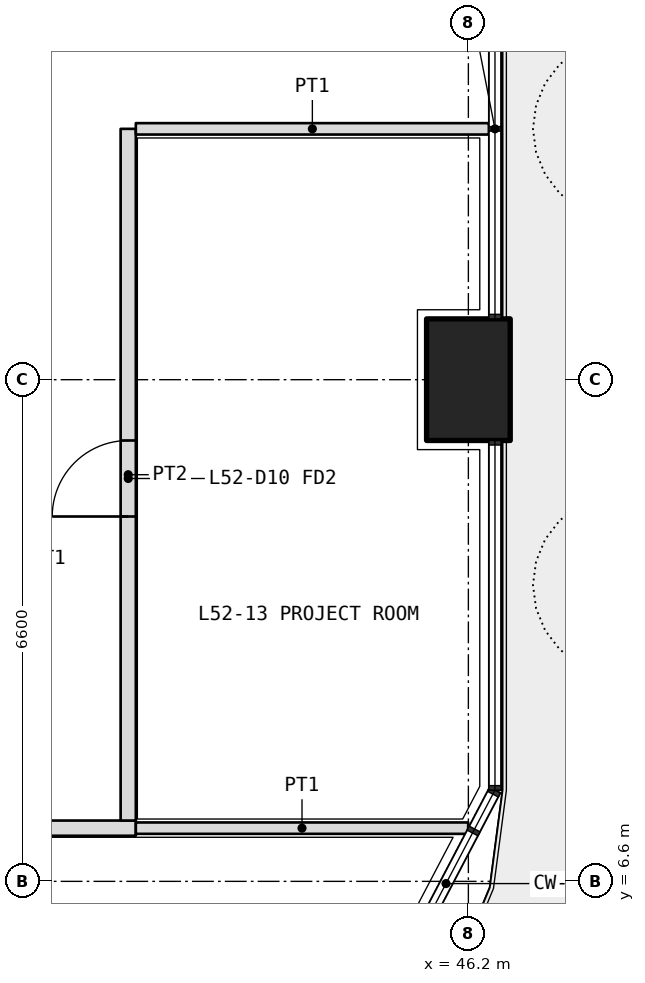
"""IFC4 building model, lengths in metres.
Left out: names, types, materials, properties, quantities, classifications, styles, units other than length and angle.
Written with IfcOpenShell. Run it as: python <this file> out.ifc"""

import sys

from ifc_helpers import new_model, si_unit, direction, frame, frame_2d, origin, origin_2d, place, context, subcontext, project, spatial, rectangle, extrude, element, fill, save


model = new_model("IFC4")
c1 = context("Model", 3, precision=1e-05, world=origin(), true_north=direction((0.0, 1.0)))
c2 = subcontext(c1, "Body", "Model", "MODEL_VIEW")
j1 = project(units=[si_unit("LENGTHUNIT", "METRE"), si_unit("PLANEANGLEUNIT", "RADIAN")], contexts=[c1])
p1 = place(None, origin())
s1 = spatial("IfcSite", under=j1, at=p1, CompositionType="ELEMENT")
p2 = place(p1, origin())
s2 = spatial("IfcBuilding", under=s1, at=p2, CompositionType="ELEMENT")
p3 = place(p2, frame((0.0, 0.0, 229.2)))
s3 = spatial("IfcBuildingStorey", under=s2, at=p3, CompositionType="ELEMENT", Elevation=229.2)
p4 = place(p3, frame((46.2, 13.2, 0.0), z_axis=(0.0, 0.0, 1.0), x_axis=(0.0, 1.0, 0.0)))
e1 = element("IfcColumn", 1, at=p4, inside=s3, PredefinedType="COLUMN", context=c2, shape_type="SweptSolid", body=[
    extrude(rectangle(XDim=1.6, YDim=1.1, at=origin_2d()), origin(), (0.0, 0.0, 1.0), 4.2),
])
p5 = place(p3, frame((10.975, 7.3, 0.0), z_axis=(0.0, 0.0, 1.0), x_axis=(1.0, 0.0, 0.0)))
e2 = element("IfcWall", 2, at=p5, inside=s3, PredefinedType="PARTITIONING", context=c2, shape_type="SweptSolid", body=[
    extrude(rectangle(XDim=30.85, YDim=0.2, at=frame_2d((15.425, 0.0))), origin(), (0.0, 0.0, 1.0), 3.0),
])
p6 = place(p5, frame((3.962, 0.0, 0.0)))
e3 = element("IfcOpeningElement", 3, at=p6, cuts=e2, PredefinedType="OPENING", context=c2, shape_type="SweptSolid", body=[
    extrude(rectangle(XDim=1.0, YDim=2.1, at=frame_2d((0.5, 1.05))), frame((0.0, 0.11, 0.0), z_axis=(0.0, -1.0, 0.0), x_axis=(1.0, 0.0, 0.0)), (0.0, 0.0, 1.0), 0.22),
])
p7 = place(p5, frame((10.425, 0.0, 0.0)))
e4 = element("IfcOpeningElement", 4, at=p7, cuts=e2, PredefinedType="OPENING", context=c2, shape_type="SweptSolid", body=[
    extrude(rectangle(XDim=1.0, YDim=2.1, at=frame_2d((0.5, 1.05))), frame((0.0, 0.11, 0.0), z_axis=(0.0, -1.0, 0.0), x_axis=(1.0, 0.0, 0.0)), (0.0, 0.0, 1.0), 0.22),
])
p8 = place(p5, frame((13.725, 0.0, 0.0)))
e5 = element("IfcOpeningElement", 5, at=p8, cuts=e2, PredefinedType="OPENING", context=c2, shape_type="SweptSolid", body=[
    extrude(rectangle(XDim=1.0, YDim=2.1, at=frame_2d((0.5, 1.05))), frame((0.0, 0.11, 0.0), z_axis=(0.0, -1.0, 0.0), x_axis=(1.0, 0.0, 0.0)), (0.0, 0.0, 1.0), 0.22),
])
p9 = place(p5, frame((22.587, 0.0, 0.0)))
e6 = element("IfcOpeningElement", 6, at=p9, cuts=e2, PredefinedType="OPENING", context=c2, shape_type="SweptSolid", body=[
    extrude(rectangle(XDim=1.0, YDim=2.1, at=frame_2d((0.5, 1.05))), frame((0.0, 0.11, 0.0), z_axis=(0.0, -1.0, 0.0), x_axis=(1.0, 0.0, 0.0)), (0.0, 0.0, 1.0), 0.22),
])
p10 = place(p3, frame((41.725, 7.4, 0.0), z_axis=(0.0, 0.0, 1.0), x_axis=(0.0, 1.0, 0.0)))
e7 = element("IfcWall", 7, at=p10, inside=s3, PredefinedType="PARTITIONING", context=c2, shape_type="SweptSolid", body=[
    extrude(rectangle(XDim=9.1, YDim=0.2, at=frame_2d((4.55, 0.0))), origin(), (0.0, 0.0, 1.0), 3.0),
])
p11 = place(p10, frame((4.0, 0.0, 0.0)))
e8 = element("IfcOpeningElement", 8, at=p11, cuts=e7, PredefinedType="OPENING", context=c2, shape_type="SweptSolid", body=[
    extrude(rectangle(XDim=1.0, YDim=2.1, at=frame_2d((0.5, 1.05))), frame((0.0, 0.11, 0.0), z_axis=(0.0, -1.0, 0.0), x_axis=(1.0, 0.0, 0.0)), (0.0, 0.0, 1.0), 0.22),
])
p12 = place(p3, frame((46.198, 7.3, 0.0), z_axis=(0.0, 0.0, 1.0), x_axis=(-1.0, 0.0, 0.0)))
e9 = element("IfcWall", 9, at=p12, inside=s3, PredefinedType="PARTITIONING", context=c2, shape_type="SweptSolid", body=[
    extrude(rectangle(XDim=4.373, YDim=0.15, at=frame_2d((2.186, 0.0))), origin(), (0.0, 0.0, 1.0), 2.7),
])
p13 = place(p3, frame((46.47, 16.5, 0.0), z_axis=(0.0, 0.0, 1.0), x_axis=(-1.0, 0.0, 0.0)))
e10 = element("IfcWall", 10, at=p13, inside=s3, PredefinedType="PARTITIONING", context=c2, shape_type="SweptSolid", body=[
    extrude(rectangle(XDim=4.645, YDim=0.15, at=frame_2d((2.323, 0.0))), origin(), (0.0, 0.0, 1.0), 2.7),
])
p14 = place(p11, origin())
e11 = element("IfcDoor", 11, at=p14, inside=s3, OperationType="SINGLE_SWING_LEFT", PredefinedType="DOOR", context=c2, shape_type="SweptSolid", body=[
    extrude(rectangle(XDim=1.0, YDim=2.1, at=frame_2d((0.5, 1.05))), frame((0.0, 0.025, 0.0), z_axis=(0.0, -1.0, 0.0), x_axis=(1.0, 0.0, 0.0)), (0.0, 0.0, 1.0), 0.05),
])
fill(e8, e11)
save(model, sys.argv[1])
